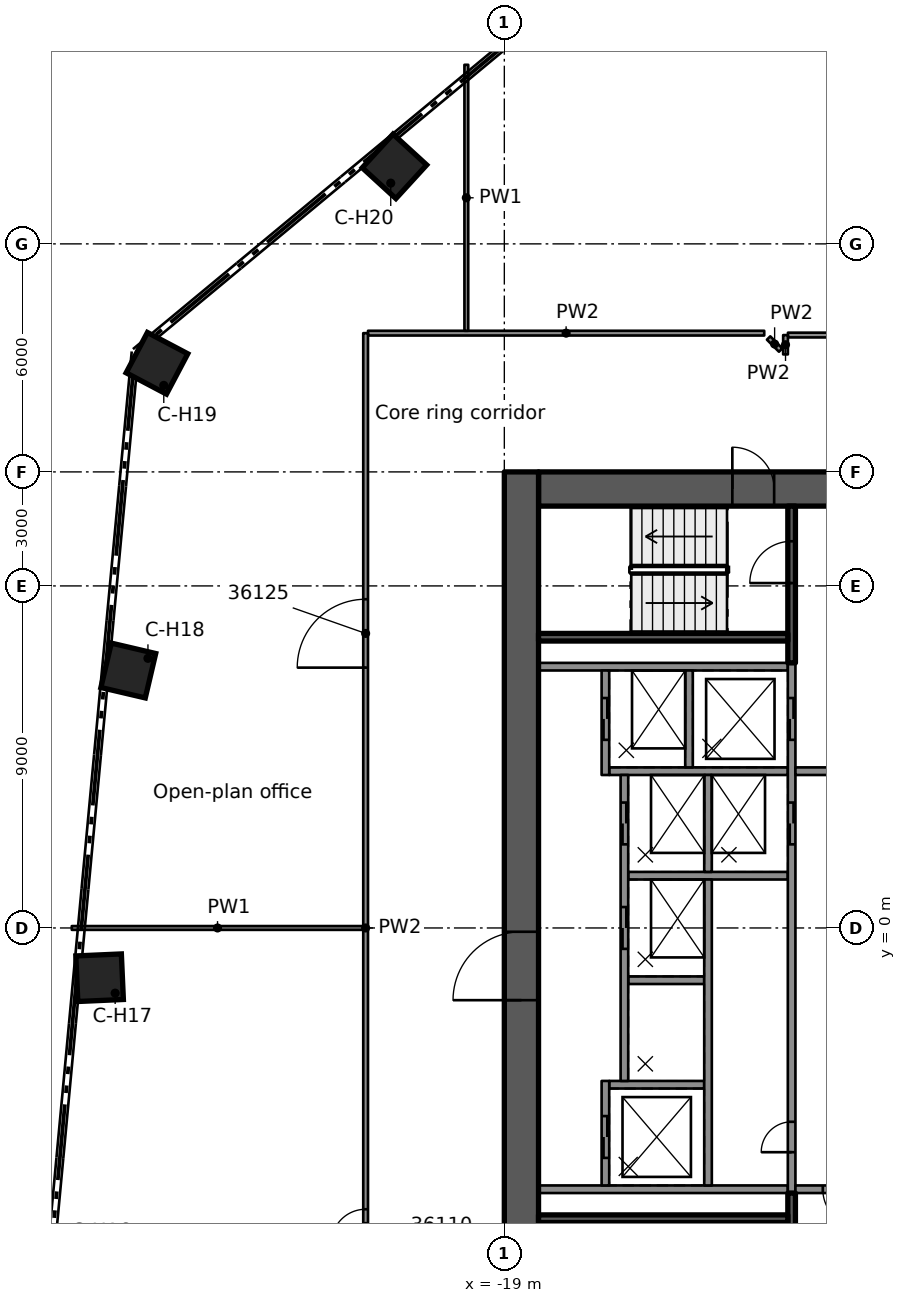
"""IFC4 building model, lengths in metres.
Left out: names, types, materials, properties, quantities, classifications, styles, units other than length and angle.
Written with IfcOpenShell. Run it as: python <this file> out.ifc"""

import sys

from ifc_helpers import new_model, si_unit, direction, frame, frame_2d, origin, origin_2d, place, context, subcontext, project, spatial, rectangle, extrude, element, fill, save


model = new_model("IFC4")
c1 = context("Model", 3, precision=1e-05, world=origin(), true_north=direction((0.0, 1.0)))
c2 = subcontext(c1, "Body", "Model", "MODEL_VIEW")
j1 = project(units=[si_unit("LENGTHUNIT", "METRE"), si_unit("PLANEANGLEUNIT", "RADIAN")], contexts=[c1])
p1 = place(None, origin())
s1 = spatial("IfcSite", under=j1, at=p1, CompositionType="ELEMENT")
p2 = place(p1, origin())
s2 = spatial("IfcBuilding", under=s1, at=p2, CompositionType="ELEMENT")
p3 = place(p2, frame((0.0, 0.0, 181.1)))
s3 = spatial("IfcBuildingStorey", under=s2, at=p3, CompositionType="ELEMENT", Elevation=181.1)
p4 = place(p3, frame((-18.1, 11.55, 0.0), z_axis=(0.0, 0.0, 1.0), x_axis=(1.0, 0.0, 0.0)))
e1 = element("IfcWall", 1, at=p4, inside=s3, PredefinedType="SHEAR", context=c2, shape_type="SweptSolid", body=[
    extrude(rectangle(XDim=9.2, YDim=0.9, at=frame_2d((4.6, 0.0))), origin(), (0.0, 0.0, 1.0), 3.5),
])
p5 = place(p4, frame((5.1, 0.0, 0.0)))
e2 = element("IfcOpeningElement", 2, at=p5, cuts=e1, PredefinedType="OPENING", context=c2, shape_type="SweptSolid", body=[
    extrude(rectangle(XDim=1.1, YDim=2.1, at=frame_2d((0.55, 1.05))), frame((0.0, 0.46, 0.0), z_axis=(0.0, -1.0, 0.0), x_axis=(1.0, 0.0, 0.0)), (0.0, 0.0, 1.0), 0.92),
])
p6 = place(p3, frame((-18.55, -12.0, 0.0), z_axis=(0.0, 0.0, 1.0), x_axis=(0.0, 1.0, 0.0)))
e3 = element("IfcWall", 3, at=p6, inside=s3, PredefinedType="SHEAR", context=c2, shape_type="SweptSolid", body=[
    extrude(rectangle(XDim=24.0, YDim=0.9, at=frame_2d((12.0, 0.0))), origin(), (0.0, 0.0, 1.0), 3.5),
])
p7 = place(p6, frame((10.1, 0.0, 0.0)))
e4 = element("IfcOpeningElement", 4, at=p7, cuts=e3, PredefinedType="OPENING", context=c2, shape_type="SweptSolid", body=[
    extrude(rectangle(XDim=1.8, YDim=2.1, at=frame_2d((0.9, 1.05))), frame((0.0, 0.46, 0.0), z_axis=(0.0, -1.0, 0.0), x_axis=(1.0, 0.0, 0.0)), (0.0, 0.0, 1.0), 0.92),
])
for number, where, z_axis, x_axis in (
    (5, (-29.65, -1.309, 0.0), (0.0, 0.0, 1.0), (-0.999, -0.044, 0.0)),
    (6, (-28.895, 6.774, 0.0), (0.0, 0.0, 1.0), (-0.974, 0.228, 0.0)),
    (7, (-28.141, 14.858, 0.0), (0.0, 0.0, 1.0), (-0.884, 0.467, 0.0)),
    (8, (-21.891, 20.04, 0.0), (0.0, 0.0, 1.0), (-0.738, 0.675, 0.0)),
):
    element("IfcColumn", number, at=place(p3, frame(where, z_axis=z_axis, x_axis=x_axis)), inside=s3, PredefinedType="COLUMN", context=c2, shape_type="SweptSolid", body=[
        extrude(rectangle(XDim=1.2, YDim=1.2, at=origin_2d()), origin(), (0.0, 0.0, 1.0), 3.5),
    ])
for number, where, z_axis, x_axis in (
    (9, (-11.54, 6.875, 0.0), (0.0, 0.0, 1.0), (-1.0, 0.0, 0.0)),
    (10, (-11.54, -6.875, 0.0), (0.0, 0.0, 1.0), (-1.0, 0.0, 0.0)),
):
    element("IfcWall", number, at=place(p3, frame(where, z_axis=z_axis, x_axis=x_axis)), inside=s3, PredefinedType="SOLIDWALL", context=c2, shape_type="SweptSolid", body=[
        extrude(rectangle(XDim=6.56, YDim=0.2, at=frame_2d((3.28, 0.0))), origin(), (0.0, 0.0, 1.0), 3.08),
    ])
p8 = place(p3, frame((-13.74, -4.125, 0.0), z_axis=(0.0, 0.0, 1.0), x_axis=(-1.0, 0.0, 0.0)))
e11 = element("IfcWall", 11, at=p8, inside=s3, PredefinedType="SOLIDWALL", context=c2, shape_type="SweptSolid", body=[
    extrude(rectangle(XDim=2.5, YDim=0.2, at=frame_2d((1.25, 0.0))), origin(), (0.0, 0.0, 1.0), 3.08),
])
p9 = place(p3, frame((-13.74, -1.375, 0.0), z_axis=(0.0, 0.0, 1.0), x_axis=(-1.0, 0.0, 0.0)))
e12 = element("IfcWall", 12, at=p9, inside=s3, PredefinedType="SOLIDWALL", context=c2, shape_type="SweptSolid", body=[
    extrude(rectangle(XDim=2.0, YDim=0.2, at=frame_2d((1.0, 0.0))), origin(), (0.0, 0.0, 1.0), 3.08),
])
p10 = place(p3, frame((-11.54, 1.375, 0.0), z_axis=(0.0, 0.0, 1.0), x_axis=(-1.0, 0.0, 0.0)))
e13 = element("IfcWall", 13, at=p10, inside=s3, PredefinedType="SOLIDWALL", context=c2, shape_type="SweptSolid", body=[
    extrude(rectangle(XDim=4.2, YDim=0.2, at=frame_2d((2.1, 0.0))), origin(), (0.0, 0.0, 1.0), 3.08),
])
p11 = place(p3, frame((-11.54, 4.125, 0.0), z_axis=(0.0, 0.0, 1.0), x_axis=(-1.0, 0.0, 0.0)))
e14 = element("IfcWall", 14, at=p11, inside=s3, PredefinedType="SOLIDWALL", context=c2, shape_type="SweptSolid", body=[
    extrude(rectangle(XDim=4.7, YDim=0.2, at=frame_2d((2.35, 0.0))), origin(), (0.0, 0.0, 1.0), 3.08),
])
p12 = place(p3, frame((-11.44, -6.975, 0.0), z_axis=(0.0, 0.0, 1.0), x_axis=(0.0, 1.0, 0.0)))
e15 = element("IfcWall", 15, at=p12, inside=s3, PredefinedType="SOLIDWALL", context=c2, shape_type="SweptSolid", body=[
    extrude(rectangle(XDim=13.95, YDim=0.2, at=frame_2d((6.975, 0.0))), origin(), (0.0, 0.0, 1.0), 3.08),
])
p13 = place(p12, frame((9.175, 0.0, 0.0)))
e16 = element("IfcOpeningElement", 16, at=p13, cuts=e15, PredefinedType="OPENING", context=c2, shape_type="SweptSolid", body=[
    extrude(rectangle(XDim=1.1, YDim=2.1, at=frame_2d((0.55, 1.05))), frame((0.0, 0.11, 0.0), z_axis=(0.0, -1.0, 0.0), x_axis=(1.0, 0.0, 0.0)), (0.0, 0.0, 1.0), 0.22),
])
p14 = place(p12, frame((11.925, 0.0, 0.0)))
e17 = element("IfcOpeningElement", 17, at=p14, cuts=e15, PredefinedType="OPENING", context=c2, shape_type="SweptSolid", body=[
    extrude(rectangle(XDim=1.1, YDim=2.1, at=frame_2d((0.55, 1.05))), frame((0.0, 0.11, 0.0), z_axis=(0.0, -1.0, 0.0), x_axis=(1.0, 0.0, 0.0)), (0.0, 0.0, 1.0), 0.22),
])
p15 = place(p12, frame((1.075, 0.0, 0.0)))
e18 = element("IfcOpeningElement", 18, at=p15, cuts=e15, PredefinedType="OPENING", context=c2, shape_type="SweptSolid", body=[
    extrude(rectangle(XDim=0.8, YDim=2.1, at=frame_2d((0.4, 1.05))), frame((0.0, 0.11, 0.0), z_axis=(0.0, -1.0, 0.0), x_axis=(1.0, 0.0, 0.0)), (0.0, 0.0, 1.0), 0.22),
])
p16 = place(p3, frame((-13.64, -6.775, 0.0), z_axis=(0.0, 0.0, 1.0), x_axis=(0.0, 1.0, 0.0)))
e19 = element("IfcWall", 19, at=p16, inside=s3, PredefinedType="SOLIDWALL", context=c2, shape_type="SweptSolid", body=[
    extrude(rectangle(XDim=8.05, YDim=0.2, at=frame_2d((4.025, 0.0))), origin(), (0.0, 0.0, 1.0), 3.08),
])
for number, where, z_axis, x_axis in (
    (20, (-13.64, 1.475, 0.0), (0.0, 0.0, 1.0), (0.0, 1.0, 0.0)),
    (21, (-14.14, 4.225, 0.0), (0.0, 0.0, 1.0), (0.0, 1.0, 0.0)),
):
    element("IfcWall", number, at=place(p3, frame(where, z_axis=z_axis, x_axis=x_axis)), inside=s3, PredefinedType="SOLIDWALL", context=c2, shape_type="SweptSolid", body=[
        extrude(rectangle(XDim=2.55, YDim=0.2, at=frame_2d((1.275, 0.0))), origin(), (0.0, 0.0, 1.0), 3.08),
    ])
p17 = place(p3, frame((-16.34, -6.775, 0.0), z_axis=(0.0, 0.0, 1.0), x_axis=(0.0, 1.0, 0.0)))
e22 = element("IfcWall", 22, at=p17, inside=s3, PredefinedType="SOLIDWALL", context=c2, shape_type="SweptSolid", body=[
    extrude(rectangle(XDim=2.75, YDim=0.2, at=frame_2d((1.375, 0.0))), origin(), (0.0, 0.0, 1.0), 3.08),
])
p18 = place(p17, frame((0.725, 0.0, 0.0)))
e23 = element("IfcOpeningElement", 23, at=p18, cuts=e22, PredefinedType="OPENING", context=c2, shape_type="SweptSolid", body=[
    extrude(rectangle(XDim=1.1, YDim=2.1, at=frame_2d((0.55, 1.05))), frame((0.0, 0.11, 0.0), z_axis=(0.0, -1.0, 0.0), x_axis=(1.0, 0.0, 0.0)), (0.0, 0.0, 1.0), 0.22),
])
p19 = place(p3, frame((-15.84, -4.025, 0.0), z_axis=(0.0, 0.0, 1.0), x_axis=(0.0, 1.0, 0.0)))
e24 = element("IfcWall", 24, at=p19, inside=s3, PredefinedType="SOLIDWALL", context=c2, shape_type="SweptSolid", body=[
    extrude(rectangle(XDim=8.05, YDim=0.2, at=frame_2d((4.025, 0.0))), origin(), (0.0, 0.0, 1.0), 3.08),
])
p20 = place(p19, frame((3.475, 0.0, 0.0)))
e25 = element("IfcOpeningElement", 25, at=p20, cuts=e24, PredefinedType="OPENING", context=c2, shape_type="SweptSolid", body=[
    extrude(rectangle(XDim=1.1, YDim=2.1, at=frame_2d((0.55, 1.05))), frame((0.0, 0.11, 0.0), z_axis=(0.0, -1.0, 0.0), x_axis=(1.0, 0.0, 0.0)), (0.0, 0.0, 1.0), 0.22),
])
p21 = place(p19, frame((6.225, 0.0, 0.0)))
e26 = element("IfcOpeningElement", 26, at=p21, cuts=e24, PredefinedType="OPENING", context=c2, shape_type="SweptSolid", body=[
    extrude(rectangle(XDim=1.1, YDim=2.1, at=frame_2d((0.55, 1.05))), frame((0.0, 0.11, 0.0), z_axis=(0.0, -1.0, 0.0), x_axis=(1.0, 0.0, 0.0)), (0.0, 0.0, 1.0), 0.22),
])
p22 = place(p3, frame((-16.34, 4.025, 0.0), z_axis=(0.0, 0.0, 1.0), x_axis=(0.0, 1.0, 0.0)))
e27 = element("IfcWall", 27, at=p22, inside=s3, PredefinedType="SOLIDWALL", context=c2, shape_type="SweptSolid", body=[
    extrude(rectangle(XDim=2.75, YDim=0.2, at=frame_2d((1.375, 0.0))), origin(), (0.0, 0.0, 1.0), 3.08),
])
p23 = place(p22, frame((0.925, 0.0, 0.0)))
e28 = element("IfcOpeningElement", 28, at=p23, cuts=e27, PredefinedType="OPENING", context=c2, shape_type="SweptSolid", body=[
    extrude(rectangle(XDim=1.1, YDim=2.1, at=frame_2d((0.55, 1.05))), frame((0.0, 0.11, 0.0), z_axis=(0.0, -1.0, 0.0), x_axis=(1.0, 0.0, 0.0)), (0.0, 0.0, 1.0), 0.22),
])
p24 = place(p3, frame((-11.44, 6.975, 0.0), z_axis=(0.0, 0.0, 1.0), x_axis=(0.0, 1.0, 0.0)))
e29 = element("IfcWall", 29, at=p24, inside=s3, PredefinedType="SOLIDWALL", context=c2, shape_type="SweptSolid", body=[
    extrude(rectangle(XDim=4.125, YDim=0.2, at=frame_2d((2.062, 0.0))), origin(), (0.0, 0.0, 1.0), 3.08),
])
p25 = place(p24, frame((2.1, 0.0, 0.0)))
e30 = element("IfcOpeningElement", 30, at=p25, cuts=e29, PredefinedType="OPENING", context=c2, shape_type="SweptSolid", body=[
    extrude(rectangle(XDim=1.1, YDim=2.1, at=frame_2d((0.55, 1.05))), frame((0.0, 0.11, 0.0), z_axis=(0.0, -1.0, 0.0), x_axis=(1.0, 0.0, 0.0)), (0.0, 0.0, 1.0), 0.22),
])
p26 = place(p3, frame((-11.54, 7.65, 0.0), z_axis=(0.0, 0.0, 1.0), x_axis=(-1.0, 0.0, 0.0)))
e31 = element("IfcWall", 31, at=p26, inside=s3, PredefinedType="SOLIDWALL", context=c2, shape_type="SweptSolid", body=[
    extrude(rectangle(XDim=6.56, YDim=0.2, at=frame_2d((3.28, 0.0))), origin(), (0.0, 0.0, 1.0), 3.08),
])
p27 = place(p3, frame((-11.44, -11.1, 0.0), z_axis=(0.0, 0.0, 1.0), x_axis=(0.0, 1.0, 0.0)))
e32 = element("IfcWall", 32, at=p27, inside=s3, PredefinedType="SOLIDWALL", context=c2, shape_type="SweptSolid", body=[
    extrude(rectangle(XDim=4.125, YDim=0.2, at=frame_2d((2.062, 0.0))), origin(), (0.0, 0.0, 1.0), 3.08),
])
p28 = place(p3, frame((-11.54, -7.65, 0.0), z_axis=(0.0, 0.0, 1.0), x_axis=(-1.0, 0.0, 0.0)))
e33 = element("IfcWall", 33, at=p28, inside=s3, PredefinedType="SOLIDWALL", context=c2, shape_type="SweptSolid", body=[
    extrude(rectangle(XDim=6.56, YDim=0.2, at=frame_2d((3.28, 0.0))), origin(), (0.0, 0.0, 1.0), 3.08),
])
p29 = place(p3, frame((-8.9, 4.125, 0.0), z_axis=(0.0, 0.0, 1.0), x_axis=(-1.0, 0.0, 0.0)))
e34 = element("IfcWall", 34, at=p29, inside=s3, PredefinedType="PARTITIONING", context=c2, shape_type="SweptSolid", body=[
    extrude(rectangle(XDim=2.44, YDim=0.2, at=frame_2d((1.22, 0.0))), origin(), (0.0, 0.0, 1.0), 3.08),
])
p30 = place(p3, frame((-8.9, -6.875, 0.0), z_axis=(0.0, 0.0, 1.0), x_axis=(-1.0, 0.0, 0.0)))
e35 = element("IfcWall", 35, at=p30, inside=s3, PredefinedType="PARTITIONING", context=c2, shape_type="SweptSolid", body=[
    extrude(rectangle(XDim=2.44, YDim=0.2, at=frame_2d((1.22, 0.0))), origin(), (0.0, 0.0, 1.0), 3.08),
])
p31 = place(p30, frame((0.72, 0.0, 0.0)))
e36 = element("IfcOpeningElement", 36, at=p31, cuts=e35, PredefinedType="OPENING", context=c2, shape_type="SweptSolid", body=[
    extrude(rectangle(XDim=1.0, YDim=2.1, at=frame_2d((0.5, 1.05))), frame((0.0, 0.11, 0.0), z_axis=(0.0, -1.0, 0.0), x_axis=(1.0, 0.0, 0.0)), (0.0, 0.0, 1.0), 0.22),
])
p32 = place(p3, frame((-12.046, 15.523, 0.0), z_axis=(0.0, 0.0, 1.0), x_axis=(0.707106781187, -0.707106781187, 0.0)))
e37 = element("IfcWall", 37, at=p32, inside=s3, PredefinedType="PARTITIONING", context=c2, shape_type="SweptSolid", body=[
    extrude(rectangle(XDim=0.448, YDim=0.125, at=frame_2d((0.224, 0.0))), origin(), (0.0, 0.0, 1.0), 3.06),
])
p33 = place(p3, frame((-30.382, 0.0, 0.0), z_axis=(0.0, 0.0, 1.0), x_axis=(1.0, 0.0, 0.0)))
e38 = element("IfcWall", 38, at=p33, inside=s3, PredefinedType="PARTITIONING", context=c2, shape_type="SweptSolid", body=[
    extrude(rectangle(XDim=7.67, YDim=0.1, at=frame_2d((3.835, 0.0))), origin(), (0.0, 0.0, 1.0), 3.06),
])
p34 = place(p3, frame((-11.537, 15.601, 0.0), z_axis=(0.0, 0.0, 1.0), x_axis=(1.0, 0.0, 0.0)))
e39 = element("IfcWall", 39, at=p34, inside=s3, PredefinedType="PARTITIONING", context=c2, shape_type="SweptSolid", body=[
    extrude(rectangle(XDim=23.074, YDim=0.125, at=frame_2d((11.537, 0.0))), origin(), (0.0, 0.0, 1.0), 3.06),
])
p35 = place(p34, frame((16.387, 0.0, 0.0)))
e40 = element("IfcOpeningElement", 40, at=p35, cuts=e39, PredefinedType="OPENING", context=c2, shape_type="SweptSolid", body=[
    extrude(rectangle(XDim=1.8, YDim=2.1, at=frame_2d((0.9, 1.05))), frame((0.0, 0.073, 0.0), z_axis=(0.0, -1.0, 0.0), x_axis=(1.0, 0.0, 0.0)), (0.0, 0.0, 1.0), 0.145),
])
p36 = place(p34, frame((4.788, 0.0, 0.0)))
e41 = element("IfcOpeningElement", 41, at=p36, cuts=e39, PredefinedType="OPENING", context=c2, shape_type="SweptSolid", body=[
    extrude(rectangle(XDim=1.8, YDim=2.1, at=frame_2d((0.9, 1.05))), frame((0.0, 0.073, 0.0), z_axis=(0.0, -1.0, 0.0), x_axis=(1.0, 0.0, 0.0)), (0.0, 0.0, 1.0), 0.145),
])
p37 = place(p3, frame((-22.587, 15.651, 0.0), z_axis=(0.0, 0.0, 1.0), x_axis=(1.0, 0.0, 0.0)))
e42 = element("IfcWall", 42, at=p37, inside=s3, PredefinedType="PARTITIONING", context=c2, shape_type="SweptSolid", body=[
    extrude(rectangle(XDim=10.426, YDim=0.125, at=frame_2d((5.213, 0.0))), origin(), (0.0, 0.0, 1.0), 3.06),
])
p38 = place(p3, frame((-11.601, 15.092, 0.0), z_axis=(0.0, 0.0, 1.0), x_axis=(0.00192214926, 0.999998152669, 0.0)))
e43 = element("IfcWall", 43, at=p38, inside=s3, PredefinedType="PARTITIONING", context=c2, shape_type="SweptSolid", body=[
    extrude(rectangle(XDim=0.508, YDim=0.125, at=frame_2d((0.254, 0.0))), origin(), (0.0, 0.0, 1.0), 3.06),
])
p39 = place(p3, frame((-20.0, 15.713, 0.0), z_axis=(0.0, 0.0, 1.0), x_axis=(0.0, 1.0, 0.0)))
e44 = element("IfcWall", 44, at=p39, inside=s3, PredefinedType="PARTITIONING", context=c2, shape_type="SweptSolid", body=[
    extrude(rectangle(XDim=6.999, YDim=0.1, at=frame_2d((3.5, 0.0))), origin(), (0.0, 0.0, 1.0), 3.06),
])
p40 = place(p3, frame((-22.65, -15.651, 0.0), z_axis=(0.0, 0.0, 1.0), x_axis=(0.0, 1.0, 0.0)))
e45 = element("IfcWall", 45, at=p40, inside=s3, PredefinedType="PARTITIONING", context=c2, shape_type="SweptSolid", body=[
    extrude(rectangle(XDim=31.302, YDim=0.125, at=frame_2d((15.651, 0.0))), origin(), (0.0, 0.0, 1.0), 3.06),
])
p41 = place(p40, frame((7.35, 0.0, 0.0)))
e46 = element("IfcOpeningElement", 46, at=p41, cuts=e45, PredefinedType="OPENING", context=c2, shape_type="SweptSolid", body=[
    extrude(rectangle(XDim=0.9, YDim=2.1, at=frame_2d((0.45, 1.05))), frame((0.0, 0.073, 0.0), z_axis=(0.0, -1.0, 0.0), x_axis=(1.0, 0.0, 0.0)), (0.0, 0.0, 1.0), 0.145),
])
p42 = place(p40, frame((22.501, 0.0, 0.0)))
e47 = element("IfcOpeningElement", 47, at=p42, cuts=e45, PredefinedType="OPENING", context=c2, shape_type="SweptSolid", body=[
    extrude(rectangle(XDim=1.8, YDim=2.1, at=frame_2d((0.9, 1.05))), frame((0.0, 0.073, 0.0), z_axis=(0.0, -1.0, 0.0), x_axis=(1.0, 0.0, 0.0)), (0.0, 0.0, 1.0), 0.145),
])
p43 = place(p18, origin())
e48 = element("IfcDoor", 48, at=p43, inside=s3, OperationType="DOUBLE_DOOR_SLIDING", PredefinedType="DOOR", context=c2, shape_type="SweptSolid", body=[
    extrude(rectangle(XDim=1.1, YDim=2.1, at=frame_2d((0.55, 1.05))), frame((0.0, 0.025, 0.0), z_axis=(0.0, -1.0, 0.0), x_axis=(1.0, 0.0, 0.0)), (0.0, 0.0, 1.0), 0.05),
])
fill(e23, e48)
p44 = place(p20, origin())
e49 = element("IfcDoor", 49, at=p44, inside=s3, OperationType="DOUBLE_DOOR_SLIDING", PredefinedType="DOOR", context=c2, shape_type="SweptSolid", body=[
    extrude(rectangle(XDim=1.1, YDim=2.1, at=frame_2d((0.55, 1.05))), frame((0.0, 0.025, 0.0), z_axis=(0.0, -1.0, 0.0), x_axis=(1.0, 0.0, 0.0)), (0.0, 0.0, 1.0), 0.05),
])
fill(e25, e49)
p45 = place(p13, origin())
e50 = element("IfcDoor", 50, at=p45, inside=s3, OperationType="DOUBLE_DOOR_SLIDING", PredefinedType="DOOR", context=c2, shape_type="SweptSolid", body=[
    extrude(rectangle(XDim=1.1, YDim=2.1, at=frame_2d((0.55, 1.05))), frame((0.0, 0.025, 0.0), z_axis=(0.0, -1.0, 0.0), x_axis=(1.0, 0.0, 0.0)), (0.0, 0.0, 1.0), 0.05),
])
fill(e16, e50)
p46 = place(p21, origin())
e51 = element("IfcDoor", 51, at=p46, inside=s3, OperationType="DOUBLE_DOOR_SLIDING", PredefinedType="DOOR", context=c2, shape_type="SweptSolid", body=[
    extrude(rectangle(XDim=1.1, YDim=2.1, at=frame_2d((0.55, 1.05))), frame((0.0, 0.025, 0.0), z_axis=(0.0, -1.0, 0.0), x_axis=(1.0, 0.0, 0.0)), (0.0, 0.0, 1.0), 0.05),
])
fill(e26, e51)
p47 = place(p14, origin())
e52 = element("IfcDoor", 52, at=p47, inside=s3, OperationType="DOUBLE_DOOR_SLIDING", PredefinedType="DOOR", context=c2, shape_type="SweptSolid", body=[
    extrude(rectangle(XDim=1.1, YDim=2.1, at=frame_2d((0.55, 1.05))), frame((0.0, 0.025, 0.0), z_axis=(0.0, -1.0, 0.0), x_axis=(1.0, 0.0, 0.0)), (0.0, 0.0, 1.0), 0.05),
])
fill(e17, e52)
p48 = place(p23, origin())
e53 = element("IfcDoor", 53, at=p48, inside=s3, OperationType="DOUBLE_DOOR_SLIDING", PredefinedType="DOOR", context=c2, shape_type="SweptSolid", body=[
    extrude(rectangle(XDim=1.1, YDim=2.1, at=frame_2d((0.55, 1.05))), frame((0.0, 0.025, 0.0), z_axis=(0.0, -1.0, 0.0), x_axis=(1.0, 0.0, 0.0)), (0.0, 0.0, 1.0), 0.05),
])
fill(e28, e53)
p49 = place(p15, origin())
e54 = element("IfcDoor", 54, at=p49, inside=s3, OperationType="SINGLE_SWING_LEFT", PredefinedType="DOOR", context=c2, shape_type="SweptSolid", body=[
    extrude(rectangle(XDim=0.8, YDim=2.1, at=frame_2d((0.4, 1.05))), frame((0.0, 0.025, 0.0), z_axis=(0.0, -1.0, 0.0), x_axis=(1.0, 0.0, 0.0)), (0.0, 0.0, 1.0), 0.05),
])
fill(e18, e54)
p50 = place(p7, origin())
e55 = element("IfcDoor", 55, at=p50, inside=s3, OperationType="SINGLE_SWING_LEFT", PredefinedType="DOOR", context=c2, shape_type="SweptSolid", body=[
    extrude(rectangle(XDim=1.8, YDim=2.1, at=frame_2d((0.9, 1.05))), frame((0.0, 0.025, 0.0), z_axis=(0.0, -1.0, 0.0), x_axis=(1.0, 0.0, 0.0)), (0.0, 0.0, 1.0), 0.05),
])
fill(e4, e55)
p51 = place(p5, origin())
e56 = element("IfcDoor", 56, at=p51, inside=s3, OperationType="SINGLE_SWING_RIGHT", PredefinedType="DOOR", context=c2, shape_type="SweptSolid", body=[
    extrude(rectangle(XDim=1.1, YDim=2.1, at=frame_2d((0.55, 1.05))), frame((0.0, 0.025, 0.0), z_axis=(0.0, -1.0, 0.0), x_axis=(1.0, 0.0, 0.0)), (0.0, 0.0, 1.0), 0.05),
])
fill(e2, e56)
p52 = place(p25, origin())
e57 = element("IfcDoor", 57, at=p52, inside=s3, OperationType="SINGLE_SWING_RIGHT", PredefinedType="DOOR", context=c2, shape_type="SweptSolid", body=[
    extrude(rectangle(XDim=1.1, YDim=2.1, at=frame_2d((0.55, 1.05))), frame((0.0, 0.025, 0.0), z_axis=(0.0, -1.0, 0.0), x_axis=(1.0, 0.0, 0.0)), (0.0, 0.0, 1.0), 0.05),
])
fill(e30, e57)
p53 = place(p31, origin())
e58 = element("IfcDoor", 58, at=p53, inside=s3, OperationType="SINGLE_SWING_RIGHT", PredefinedType="DOOR", context=c2, shape_type="SweptSolid", body=[
    extrude(rectangle(XDim=1.0, YDim=2.1, at=frame_2d((0.5, 1.05))), frame((0.0, 0.025, 0.0), z_axis=(0.0, -1.0, 0.0), x_axis=(1.0, 0.0, 0.0)), (0.0, 0.0, 1.0), 0.05),
])
fill(e36, e58)
p54 = place(p41, origin())
e59 = element("IfcDoor", 59, at=p54, inside=s3, OperationType="SINGLE_SWING_LEFT", PredefinedType="DOOR", context=c2, shape_type="SweptSolid", body=[
    extrude(rectangle(XDim=0.9, YDim=2.1, at=frame_2d((0.45, 1.05))), frame((0.0, 0.025, 0.0), z_axis=(0.0, -1.0, 0.0), x_axis=(1.0, 0.0, 0.0)), (0.0, 0.0, 1.0), 0.05),
])
fill(e46, e59)
p55 = place(p42, origin())
e60 = element("IfcDoor", 60, at=p55, inside=s3, OperationType="DOUBLE_DOOR_SINGLE_SWING", PredefinedType="DOOR", context=c2, shape_type="SweptSolid", body=[
    extrude(rectangle(XDim=1.8, YDim=2.1, at=frame_2d((0.9, 1.05))), frame((0.0, 0.025, 0.0), z_axis=(0.0, -1.0, 0.0), x_axis=(1.0, 0.0, 0.0)), (0.0, 0.0, 1.0), 0.05),
])
fill(e47, e60)
save(model, sys.argv[1])
